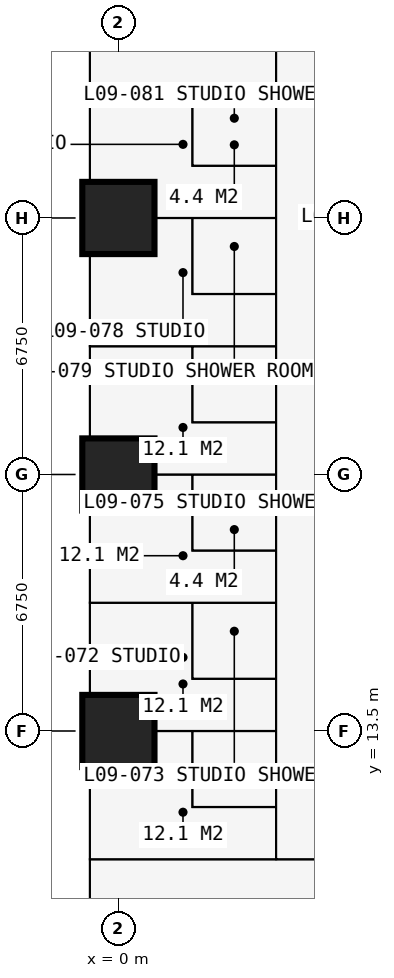
"""IFC4 building model, lengths in metres.
Left out: names, types, materials, properties, quantities, classifications, styles, units other than length and angle.
Written with IfcOpenShell. Run it as: python <this file> out.ifc"""

import sys

from ifc_helpers import new_model, si_unit, direction, frame, frame_2d, origin, origin_2d, place, context, subcontext, project, spatial, rectangle, extrude, element, fill, save


model = new_model("IFC4")
c1 = context("Model", 3, precision=1e-05, world=origin(), true_north=direction((0.0, 1.0)))
c2 = subcontext(c1, "Body", "Model", "MODEL_VIEW")
j1 = project(units=[si_unit("LENGTHUNIT", "METRE"), si_unit("PLANEANGLEUNIT", "RADIAN")], contexts=[c1])
p1 = place(None, origin())
s1 = spatial("IfcSite", under=j1, at=p1, CompositionType="ELEMENT")
p2 = place(p1, origin())
s2 = spatial("IfcBuilding", under=s1, at=p2, CompositionType="ELEMENT")
p3 = place(p2, frame((0.0, 0.0, 36.0)))
s3 = spatial("IfcBuildingStorey", under=s2, at=p3, CompositionType="ELEMENT", Elevation=36.0)
for number, where, z_axis, x_axis in (
    (1, (0.0, 13.5, 0.0), (0.0, 0.0, 1.0), (1.0, 0.0, 0.0)),
    (2, (0.0, 20.25, 0.0), (0.0, 0.0, 1.0), (1.0, 0.0, 0.0)),
    (3, (0.0, 27.0, 0.0), (0.0, 0.0, 1.0), (1.0, 0.0, 0.0)),
):
    element("IfcColumn", number, at=place(p3, frame(where, z_axis=z_axis, x_axis=x_axis)), inside=s3, PredefinedType="COLUMN", context=c2, shape_type="SweptSolid", body=[
        extrude(rectangle(XDim=1.9, YDim=1.9, at=origin_2d()), origin(), (0.0, 0.0, 1.0), 3.6),
    ])
p4 = place(p3, frame((-0.75, 20.25, 0.0), z_axis=(0.0, 0.0, 1.0), x_axis=(0.0, 1.0, 0.0)))
e4 = element("IfcWall", 4, at=p4, inside=s3, PredefinedType="SOLIDWALL", context=c2, shape_type="SweptSolid", body=[
    extrude(rectangle(XDim=6.75, YDim=0.15, at=frame_2d((3.375, 0.0))), origin(), (0.0, 0.0, 1.0), 3.375),
])
p5 = place(p4, frame((0.996, 0.0, 0.0)))
e5 = element("IfcOpeningElement", 5, at=p5, cuts=e4, PredefinedType="OPENING", context=c2, shape_type="SweptSolid", body=[
    extrude(rectangle(XDim=1.0, YDim=2.2, at=frame_2d((0.5, 1.1))), frame((0.0, 0.085, 0.0), z_axis=(0.0, -1.0, 0.0), x_axis=(1.0, 0.0, 0.0)), (0.0, 0.0, 1.0), 0.17),
])
p6 = place(p4, frame((2.042, 0.0, 0.9)))
e6 = element("IfcOpeningElement", 6, at=p6, cuts=e4, PredefinedType="OPENING", context=c2, shape_type="SweptSolid", body=[
    extrude(rectangle(XDim=1.2, YDim=1.8, at=frame_2d((0.6, 0.9))), frame((0.0, 0.085, 0.0), z_axis=(0.0, -1.0, 0.0), x_axis=(1.0, 0.0, 0.0)), (0.0, 0.0, 1.0), 0.17),
])
p7 = place(p4, frame((4.754, 0.0, 0.0)))
e7 = element("IfcOpeningElement", 7, at=p7, cuts=e4, PredefinedType="OPENING", context=c2, shape_type="SweptSolid", body=[
    extrude(rectangle(XDim=1.0, YDim=2.2, at=frame_2d((0.5, 1.1))), frame((0.0, 0.085, 0.0), z_axis=(0.0, -1.0, 0.0), x_axis=(1.0, 0.0, 0.0)), (0.0, 0.0, 1.0), 0.17),
])
p8 = place(p4, frame((3.508, 0.0, 0.9)))
e8 = element("IfcOpeningElement", 8, at=p8, cuts=e4, PredefinedType="OPENING", context=c2, shape_type="SweptSolid", body=[
    extrude(rectangle(XDim=1.2, YDim=1.8, at=frame_2d((0.6, 0.9))), frame((0.0, 0.085, 0.0), z_axis=(0.0, -1.0, 0.0), x_axis=(1.0, 0.0, 0.0)), (0.0, 0.0, 1.0), 0.17),
])
p9 = place(p3, frame((-0.85, 23.625, 0.0), z_axis=(0.0, 0.0, 1.0), x_axis=(-1.0, 0.0, 0.0)))
e9 = element("IfcWall", 9, at=p9, inside=s3, PredefinedType="USERDEFINED", context=c2, shape_type="SweptSolid", body=[
    extrude(rectangle(XDim=2.2, YDim=1.0, at=frame_2d((1.1, 0.0))), origin(), (0.0, 0.0, 1.0), 0.9),
])
p10 = place(p3, frame((-0.734, 10.125, 0.0), z_axis=(0.0, 0.0, 1.0), x_axis=(1.0, 0.0, 0.0)))
e10 = element("IfcWall", 10, at=p10, inside=s3, PredefinedType="PARTITIONING", context=c2, shape_type="SweptSolid", body=[
    extrude(rectangle(XDim=10.859, YDim=0.15, at=frame_2d((5.429, 0.0))), origin(), (0.0, 0.0, 1.0), 3.375),
])
p11 = place(p10, frame((5.134, 0.0, 0.0)))
e11 = element("IfcOpeningElement", 11, at=p11, cuts=e10, PredefinedType="OPENING", context=c2, shape_type="SweptSolid", body=[
    extrude(rectangle(XDim=1.0, YDim=2.2, at=frame_2d((0.5, 1.1))), frame((0.0, 0.085, 0.0), z_axis=(0.0, -1.0, 0.0), x_axis=(1.0, 0.0, 0.0)), (0.0, 0.0, 1.0), 0.17),
])
p12 = place(p3, frame((-0.734, 13.5, 0.0), z_axis=(0.0, 0.0, 1.0), x_axis=(1.0, 0.0, 0.0)))
e12 = element("IfcWall", 12, at=p12, inside=s3, PredefinedType="PARTITIONING", context=c2, shape_type="SweptSolid", body=[
    extrude(rectangle(XDim=4.884, YDim=0.175, at=frame_2d((2.442, 0.0))), origin(), (0.0, 0.0, 1.0), 2.61),
])
p13 = place(p3, frame((-0.734, 16.875, 0.0), z_axis=(0.0, 0.0, 1.0), x_axis=(1.0, 0.0, 0.0)))
e13 = element("IfcWall", 13, at=p13, inside=s3, PredefinedType="PARTITIONING", context=c2, shape_type="SweptSolid", body=[
    extrude(rectangle(XDim=4.884, YDim=0.175, at=frame_2d((2.442, 0.0))), origin(), (0.0, 0.0, 1.0), 3.375),
])
p14 = place(p3, frame((-0.734, 20.25, 0.0), z_axis=(0.0, 0.0, 1.0), x_axis=(1.0, 0.0, 0.0)))
e14 = element("IfcWall", 14, at=p14, inside=s3, PredefinedType="PARTITIONING", context=c2, shape_type="SweptSolid", body=[
    extrude(rectangle(XDim=4.884, YDim=0.175, at=frame_2d((2.442, 0.0))), origin(), (0.0, 0.0, 1.0), 2.61),
])
p15 = place(p3, frame((-0.734, 23.625, 0.0), z_axis=(0.0, 0.0, 1.0), x_axis=(1.0, 0.0, 0.0)))
e15 = element("IfcWall", 15, at=p15, inside=s3, PredefinedType="PARTITIONING", context=c2, shape_type="SweptSolid", body=[
    extrude(rectangle(XDim=4.884, YDim=0.175, at=frame_2d((2.442, 0.0))), origin(), (0.0, 0.0, 1.0), 3.375),
])
p16 = place(p3, frame((-0.734, 27.0, 0.0), z_axis=(0.0, 0.0, 1.0), x_axis=(1.0, 0.0, 0.0)))
e16 = element("IfcWall", 16, at=p16, inside=s3, PredefinedType="PARTITIONING", context=c2, shape_type="SweptSolid", body=[
    extrude(rectangle(XDim=4.884, YDim=0.175, at=frame_2d((2.442, 0.0))), origin(), (0.0, 0.0, 1.0), 2.877),
])
p17 = place(p3, frame((-0.734, 30.375, 0.0), z_axis=(0.0, 0.0, 1.0), x_axis=(1.0, 0.0, 0.0)))
e17 = element("IfcWall", 17, at=p17, inside=s3, PredefinedType="PARTITIONING", context=c2, shape_type="SweptSolid", body=[
    extrude(rectangle(XDim=4.884, YDim=0.15, at=frame_2d((2.442, 0.0))), origin(), (0.0, 0.0, 1.0), 3.375),
])
p18 = place(p3, frame((1.95, 11.5, 0.0), z_axis=(0.0, 0.0, 1.0), x_axis=(0.0, 1.0, 0.0)))
e18 = element("IfcWall", 18, at=p18, inside=s3, PredefinedType="PARTITIONING", context=c2, shape_type="SweptSolid", body=[
    extrude(rectangle(XDim=2.0, YDim=0.1, at=frame_2d((1.0, 0.0))), origin(), (0.0, 0.0, 1.0), 3.375),
])
p19 = place(p3, frame((1.95, 11.5, 0.0), z_axis=(0.0, 0.0, 1.0), x_axis=(1.0, 0.0, 0.0)))
e19 = element("IfcWall", 19, at=p19, inside=s3, PredefinedType="PARTITIONING", context=c2, shape_type="SweptSolid", body=[
    extrude(rectangle(XDim=2.2, YDim=0.1, at=frame_2d((1.1, 0.0))), origin(), (0.0, 0.0, 1.0), 3.375),
])
p20 = place(p19, frame((0.65, 0.0, 0.0)))
e20 = element("IfcOpeningElement", 20, at=p20, cuts=e19, PredefinedType="OPENING", context=c2, shape_type="SweptSolid", body=[
    extrude(rectangle(XDim=0.9, YDim=2.2, at=frame_2d((0.45, 1.1))), frame((0.0, 0.06, 0.0), z_axis=(0.0, -1.0, 0.0), x_axis=(1.0, 0.0, 0.0)), (0.0, 0.0, 1.0), 0.12),
])
p21 = place(p3, frame((1.95, 14.875, 0.0), z_axis=(0.0, 0.0, 1.0), x_axis=(0.0, 1.0, 0.0)))
e21 = element("IfcWall", 21, at=p21, inside=s3, PredefinedType="PARTITIONING", context=c2, shape_type="SweptSolid", body=[
    extrude(rectangle(XDim=2.0, YDim=0.1, at=frame_2d((1.0, 0.0))), origin(), (0.0, 0.0, 1.0), 3.375),
])
p22 = place(p3, frame((1.95, 14.875, 0.0), z_axis=(0.0, 0.0, 1.0), x_axis=(1.0, 0.0, 0.0)))
e22 = element("IfcWall", 22, at=p22, inside=s3, PredefinedType="PARTITIONING", context=c2, shape_type="SweptSolid", body=[
    extrude(rectangle(XDim=2.2, YDim=0.1, at=frame_2d((1.1, 0.0))), origin(), (0.0, 0.0, 1.0), 3.375),
])
p23 = place(p22, frame((0.65, 0.0, 0.0)))
e23 = element("IfcOpeningElement", 23, at=p23, cuts=e22, PredefinedType="OPENING", context=c2, shape_type="SweptSolid", body=[
    extrude(rectangle(XDim=0.9, YDim=2.2, at=frame_2d((0.45, 1.1))), frame((0.0, 0.06, 0.0), z_axis=(0.0, -1.0, 0.0), x_axis=(1.0, 0.0, 0.0)), (0.0, 0.0, 1.0), 0.12),
])
p24 = place(p3, frame((1.95, 18.25, 0.0), z_axis=(0.0, 0.0, 1.0), x_axis=(0.0, 1.0, 0.0)))
e24 = element("IfcWall", 24, at=p24, inside=s3, PredefinedType="PARTITIONING", context=c2, shape_type="SweptSolid", body=[
    extrude(rectangle(XDim=2.0, YDim=0.1, at=frame_2d((1.0, 0.0))), origin(), (0.0, 0.0, 1.0), 3.375),
])
p25 = place(p3, frame((1.95, 18.25, 0.0), z_axis=(0.0, 0.0, 1.0), x_axis=(1.0, 0.0, 0.0)))
e25 = element("IfcWall", 25, at=p25, inside=s3, PredefinedType="PARTITIONING", context=c2, shape_type="SweptSolid", body=[
    extrude(rectangle(XDim=2.2, YDim=0.1, at=frame_2d((1.1, 0.0))), origin(), (0.0, 0.0, 1.0), 3.375),
])
p26 = place(p25, frame((0.65, 0.0, 0.0)))
e26 = element("IfcOpeningElement", 26, at=p26, cuts=e25, PredefinedType="OPENING", context=c2, shape_type="SweptSolid", body=[
    extrude(rectangle(XDim=0.9, YDim=2.2, at=frame_2d((0.45, 1.1))), frame((0.0, 0.06, 0.0), z_axis=(0.0, -1.0, 0.0), x_axis=(1.0, 0.0, 0.0)), (0.0, 0.0, 1.0), 0.12),
])
p27 = place(p3, frame((1.95, 21.625, 0.0), z_axis=(0.0, 0.0, 1.0), x_axis=(0.0, 1.0, 0.0)))
e27 = element("IfcWall", 27, at=p27, inside=s3, PredefinedType="PARTITIONING", context=c2, shape_type="SweptSolid", body=[
    extrude(rectangle(XDim=2.0, YDim=0.1, at=frame_2d((1.0, 0.0))), origin(), (0.0, 0.0, 1.0), 3.375),
])
p28 = place(p3, frame((1.95, 21.625, 0.0), z_axis=(0.0, 0.0, 1.0), x_axis=(1.0, 0.0, 0.0)))
e28 = element("IfcWall", 28, at=p28, inside=s3, PredefinedType="PARTITIONING", context=c2, shape_type="SweptSolid", body=[
    extrude(rectangle(XDim=2.2, YDim=0.1, at=frame_2d((1.1, 0.0))), origin(), (0.0, 0.0, 1.0), 3.375),
])
p29 = place(p28, frame((0.65, 0.0, 0.0)))
e29 = element("IfcOpeningElement", 29, at=p29, cuts=e28, PredefinedType="OPENING", context=c2, shape_type="SweptSolid", body=[
    extrude(rectangle(XDim=0.9, YDim=2.2, at=frame_2d((0.45, 1.1))), frame((0.0, 0.06, 0.0), z_axis=(0.0, -1.0, 0.0), x_axis=(1.0, 0.0, 0.0)), (0.0, 0.0, 1.0), 0.12),
])
p30 = place(p3, frame((1.95, 25.0, 0.0), z_axis=(0.0, 0.0, 1.0), x_axis=(0.0, 1.0, 0.0)))
e30 = element("IfcWall", 30, at=p30, inside=s3, PredefinedType="PARTITIONING", context=c2, shape_type="SweptSolid", body=[
    extrude(rectangle(XDim=2.0, YDim=0.1, at=frame_2d((1.0, 0.0))), origin(), (0.0, 0.0, 1.0), 3.375),
])
p31 = place(p3, frame((1.95, 25.0, 0.0), z_axis=(0.0, 0.0, 1.0), x_axis=(1.0, 0.0, 0.0)))
e31 = element("IfcWall", 31, at=p31, inside=s3, PredefinedType="PARTITIONING", context=c2, shape_type="SweptSolid", body=[
    extrude(rectangle(XDim=2.2, YDim=0.1, at=frame_2d((1.1, 0.0))), origin(), (0.0, 0.0, 1.0), 3.375),
])
p32 = place(p31, frame((0.65, 0.0, 0.0)))
e32 = element("IfcOpeningElement", 32, at=p32, cuts=e31, PredefinedType="OPENING", context=c2, shape_type="SweptSolid", body=[
    extrude(rectangle(XDim=0.9, YDim=2.2, at=frame_2d((0.45, 1.1))), frame((0.0, 0.06, 0.0), z_axis=(0.0, -1.0, 0.0), x_axis=(1.0, 0.0, 0.0)), (0.0, 0.0, 1.0), 0.12),
])
p33 = place(p3, frame((1.95, 28.375, 0.0), z_axis=(0.0, 0.0, 1.0), x_axis=(0.0, 1.0, 0.0)))
e33 = element("IfcWall", 33, at=p33, inside=s3, PredefinedType="PARTITIONING", context=c2, shape_type="SweptSolid", body=[
    extrude(rectangle(XDim=2.0, YDim=0.1, at=frame_2d((1.0, 0.0))), origin(), (0.0, 0.0, 1.0), 3.375),
])
p34 = place(p3, frame((1.95, 28.375, 0.0), z_axis=(0.0, 0.0, 1.0), x_axis=(1.0, 0.0, 0.0)))
e34 = element("IfcWall", 34, at=p34, inside=s3, PredefinedType="PARTITIONING", context=c2, shape_type="SweptSolid", body=[
    extrude(rectangle(XDim=2.2, YDim=0.1, at=frame_2d((1.1, 0.0))), origin(), (0.0, 0.0, 1.0), 3.375),
])
p35 = place(p34, frame((0.65, 0.0, 0.0)))
e35 = element("IfcOpeningElement", 35, at=p35, cuts=e34, PredefinedType="OPENING", context=c2, shape_type="SweptSolid", body=[
    extrude(rectangle(XDim=0.9, YDim=2.2, at=frame_2d((0.45, 1.1))), frame((0.0, 0.06, 0.0), z_axis=(0.0, -1.0, 0.0), x_axis=(1.0, 0.0, 0.0)), (0.0, 0.0, 1.0), 0.12),
])
p36 = place(p3, frame((4.15, 10.125, 0.0), z_axis=(0.0, 0.0, 1.0), x_axis=(0.0, 1.0, 0.0)))
e36 = element("IfcWall", 36, at=p36, inside=s3, PredefinedType="PARTITIONING", context=c2, shape_type="SweptSolid", body=[
    extrude(rectangle(XDim=23.625, YDim=0.1, at=frame_2d((11.812, 0.0))), origin(), (0.0, 0.0, 1.0), 3.375),
])
p37 = place(p36, frame((0.2, 0.0, 0.0)))
e37 = element("IfcOpeningElement", 37, at=p37, cuts=e36, PredefinedType="OPENING", context=c2, shape_type="SweptSolid", body=[
    extrude(rectangle(XDim=0.95, YDim=2.2, at=frame_2d((0.475, 1.1))), frame((0.0, 0.06, 0.0), z_axis=(0.0, -1.0, 0.0), x_axis=(1.0, 0.0, 0.0)), (0.0, 0.0, 1.0), 0.12),
])
p38 = place(p36, frame((3.625, 0.0, 0.0)))
e38 = element("IfcOpeningElement", 38, at=p38, cuts=e36, PredefinedType="OPENING", context=c2, shape_type="SweptSolid", body=[
    extrude(rectangle(XDim=0.95, YDim=2.2, at=frame_2d((0.475, 1.1))), frame((0.0, 0.06, 0.0), z_axis=(0.0, -1.0, 0.0), x_axis=(1.0, 0.0, 0.0)), (0.0, 0.0, 1.0), 0.12),
])
p39 = place(p36, frame((7.0, 0.0, 0.0)))
e39 = element("IfcOpeningElement", 39, at=p39, cuts=e36, PredefinedType="OPENING", context=c2, shape_type="SweptSolid", body=[
    extrude(rectangle(XDim=0.95, YDim=2.2, at=frame_2d((0.475, 1.1))), frame((0.0, 0.06, 0.0), z_axis=(0.0, -1.0, 0.0), x_axis=(1.0, 0.0, 0.0)), (0.0, 0.0, 1.0), 0.12),
])
p40 = place(p36, frame((10.375, 0.0, 0.0)))
e40 = element("IfcOpeningElement", 40, at=p40, cuts=e36, PredefinedType="OPENING", context=c2, shape_type="SweptSolid", body=[
    extrude(rectangle(XDim=0.95, YDim=2.2, at=frame_2d((0.475, 1.1))), frame((0.0, 0.06, 0.0), z_axis=(0.0, -1.0, 0.0), x_axis=(1.0, 0.0, 0.0)), (0.0, 0.0, 1.0), 0.12),
])
p41 = place(p36, frame((13.75, 0.0, 0.0)))
e41 = element("IfcOpeningElement", 41, at=p41, cuts=e36, PredefinedType="OPENING", context=c2, shape_type="SweptSolid", body=[
    extrude(rectangle(XDim=0.95, YDim=2.2, at=frame_2d((0.475, 1.1))), frame((0.0, 0.06, 0.0), z_axis=(0.0, -1.0, 0.0), x_axis=(1.0, 0.0, 0.0)), (0.0, 0.0, 1.0), 0.12),
])
p42 = place(p36, frame((17.125, 0.0, 0.0)))
e42 = element("IfcOpeningElement", 42, at=p42, cuts=e36, PredefinedType="OPENING", context=c2, shape_type="SweptSolid", body=[
    extrude(rectangle(XDim=0.95, YDim=2.2, at=frame_2d((0.475, 1.1))), frame((0.0, 0.06, 0.0), z_axis=(0.0, -1.0, 0.0), x_axis=(1.0, 0.0, 0.0)), (0.0, 0.0, 1.0), 0.12),
])
p43 = place(p5, origin())
e43 = element("IfcDoor", 43, at=p43, inside=s3, OperationType="SINGLE_SWING_LEFT", PredefinedType="DOOR", context=c2, shape_type="SweptSolid", body=[
    extrude(rectangle(XDim=1.0, YDim=2.2, at=frame_2d((0.5, 1.1))), frame((0.0, 0.025, 0.0), z_axis=(0.0, -1.0, 0.0), x_axis=(1.0, 0.0, 0.0)), (0.0, 0.0, 1.0), 0.05),
])
fill(e5, e43)
p44 = place(p6, origin())
e44 = element("IfcWindow", 44, at=p44, inside=s3, PartitioningType="SINGLE_PANEL", PredefinedType="WINDOW", context=c2, shape_type="SweptSolid", body=[
    extrude(rectangle(XDim=1.2, YDim=1.8, at=frame_2d((0.6, 0.9))), frame((0.0, 0.03, 0.0), z_axis=(0.0, -1.0, 0.0), x_axis=(1.0, 0.0, 0.0)), (0.0, 0.0, 1.0), 0.06),
])
fill(e6, e44)
p45 = place(p7, origin())
e45 = element("IfcDoor", 45, at=p45, inside=s3, OperationType="SINGLE_SWING_RIGHT", PredefinedType="DOOR", context=c2, shape_type="SweptSolid", body=[
    extrude(rectangle(XDim=1.0, YDim=2.2, at=frame_2d((0.5, 1.1))), frame((0.0, 0.025, 0.0), z_axis=(0.0, -1.0, 0.0), x_axis=(1.0, 0.0, 0.0)), (0.0, 0.0, 1.0), 0.05),
])
fill(e7, e45)
p46 = place(p8, origin())
e46 = element("IfcWindow", 46, at=p46, inside=s3, PartitioningType="SINGLE_PANEL", PredefinedType="WINDOW", context=c2, shape_type="SweptSolid", body=[
    extrude(rectangle(XDim=1.2, YDim=1.8, at=frame_2d((0.6, 0.9))), frame((0.0, 0.03, 0.0), z_axis=(0.0, -1.0, 0.0), x_axis=(1.0, 0.0, 0.0)), (0.0, 0.0, 1.0), 0.06),
])
fill(e8, e46)
p47 = place(p11, origin())
e47 = element("IfcDoor", 47, at=p47, inside=s3, OperationType="SINGLE_SWING_LEFT", PredefinedType="DOOR", context=c2, shape_type="SweptSolid", body=[
    extrude(rectangle(XDim=1.0, YDim=2.2, at=frame_2d((0.5, 1.1))), frame((0.0, 0.025, 0.0), z_axis=(0.0, -1.0, 0.0), x_axis=(1.0, 0.0, 0.0)), (0.0, 0.0, 1.0), 0.05),
])
fill(e11, e47)
p48 = place(p37, origin())
e48 = element("IfcDoor", 48, at=p48, inside=s3, OperationType="SINGLE_SWING_LEFT", PredefinedType="DOOR", context=c2, shape_type="SweptSolid", body=[
    extrude(rectangle(XDim=0.95, YDim=2.2, at=frame_2d((0.475, 1.1))), frame((0.0, 0.025, 0.0), z_axis=(0.0, -1.0, 0.0), x_axis=(1.0, 0.0, 0.0)), (0.0, 0.0, 1.0), 0.05),
])
fill(e37, e48)
p49 = place(p20, origin())
e49 = element("IfcDoor", 49, at=p49, inside=s3, OperationType="SINGLE_SWING_RIGHT", PredefinedType="DOOR", context=c2, shape_type="SweptSolid", body=[
    extrude(rectangle(XDim=0.9, YDim=2.2, at=frame_2d((0.45, 1.1))), frame((0.0, 0.025, 0.0), z_axis=(0.0, -1.0, 0.0), x_axis=(1.0, 0.0, 0.0)), (0.0, 0.0, 1.0), 0.05),
])
fill(e20, e49)
p50 = place(p38, origin())
e50 = element("IfcDoor", 50, at=p50, inside=s3, OperationType="SINGLE_SWING_LEFT", PredefinedType="DOOR", context=c2, shape_type="SweptSolid", body=[
    extrude(rectangle(XDim=0.95, YDim=2.2, at=frame_2d((0.475, 1.1))), frame((0.0, 0.025, 0.0), z_axis=(0.0, -1.0, 0.0), x_axis=(1.0, 0.0, 0.0)), (0.0, 0.0, 1.0), 0.05),
])
fill(e38, e50)
p51 = place(p23, origin())
e51 = element("IfcDoor", 51, at=p51, inside=s3, OperationType="SINGLE_SWING_RIGHT", PredefinedType="DOOR", context=c2, shape_type="SweptSolid", body=[
    extrude(rectangle(XDim=0.9, YDim=2.2, at=frame_2d((0.45, 1.1))), frame((0.0, 0.025, 0.0), z_axis=(0.0, -1.0, 0.0), x_axis=(1.0, 0.0, 0.0)), (0.0, 0.0, 1.0), 0.05),
])
fill(e23, e51)
p52 = place(p39, origin())
e52 = element("IfcDoor", 52, at=p52, inside=s3, OperationType="SINGLE_SWING_LEFT", PredefinedType="DOOR", context=c2, shape_type="SweptSolid", body=[
    extrude(rectangle(XDim=0.95, YDim=2.2, at=frame_2d((0.475, 1.1))), frame((0.0, 0.025, 0.0), z_axis=(0.0, -1.0, 0.0), x_axis=(1.0, 0.0, 0.0)), (0.0, 0.0, 1.0), 0.05),
])
fill(e39, e52)
p53 = place(p26, origin())
e53 = element("IfcDoor", 53, at=p53, inside=s3, OperationType="SINGLE_SWING_RIGHT", PredefinedType="DOOR", context=c2, shape_type="SweptSolid", body=[
    extrude(rectangle(XDim=0.9, YDim=2.2, at=frame_2d((0.45, 1.1))), frame((0.0, 0.025, 0.0), z_axis=(0.0, -1.0, 0.0), x_axis=(1.0, 0.0, 0.0)), (0.0, 0.0, 1.0), 0.05),
])
fill(e26, e53)
p54 = place(p40, origin())
e54 = element("IfcDoor", 54, at=p54, inside=s3, OperationType="SINGLE_SWING_LEFT", PredefinedType="DOOR", context=c2, shape_type="SweptSolid", body=[
    extrude(rectangle(XDim=0.95, YDim=2.2, at=frame_2d((0.475, 1.1))), frame((0.0, 0.025, 0.0), z_axis=(0.0, -1.0, 0.0), x_axis=(1.0, 0.0, 0.0)), (0.0, 0.0, 1.0), 0.05),
])
fill(e40, e54)
p55 = place(p29, origin())
e55 = element("IfcDoor", 55, at=p55, inside=s3, OperationType="SINGLE_SWING_RIGHT", PredefinedType="DOOR", context=c2, shape_type="SweptSolid", body=[
    extrude(rectangle(XDim=0.9, YDim=2.2, at=frame_2d((0.45, 1.1))), frame((0.0, 0.025, 0.0), z_axis=(0.0, -1.0, 0.0), x_axis=(1.0, 0.0, 0.0)), (0.0, 0.0, 1.0), 0.05),
])
fill(e29, e55)
p56 = place(p41, origin())
e56 = element("IfcDoor", 56, at=p56, inside=s3, OperationType="SINGLE_SWING_LEFT", PredefinedType="DOOR", context=c2, shape_type="SweptSolid", body=[
    extrude(rectangle(XDim=0.95, YDim=2.2, at=frame_2d((0.475, 1.1))), frame((0.0, 0.025, 0.0), z_axis=(0.0, -1.0, 0.0), x_axis=(1.0, 0.0, 0.0)), (0.0, 0.0, 1.0), 0.05),
])
fill(e41, e56)
p57 = place(p32, origin())
e57 = element("IfcDoor", 57, at=p57, inside=s3, OperationType="SINGLE_SWING_RIGHT", PredefinedType="DOOR", context=c2, shape_type="SweptSolid", body=[
    extrude(rectangle(XDim=0.9, YDim=2.2, at=frame_2d((0.45, 1.1))), frame((0.0, 0.025, 0.0), z_axis=(0.0, -1.0, 0.0), x_axis=(1.0, 0.0, 0.0)), (0.0, 0.0, 1.0), 0.05),
])
fill(e32, e57)
p58 = place(p42, origin())
e58 = element("IfcDoor", 58, at=p58, inside=s3, OperationType="SINGLE_SWING_LEFT", PredefinedType="DOOR", context=c2, shape_type="SweptSolid", body=[
    extrude(rectangle(XDim=0.95, YDim=2.2, at=frame_2d((0.475, 1.1))), frame((0.0, 0.025, 0.0), z_axis=(0.0, -1.0, 0.0), x_axis=(1.0, 0.0, 0.0)), (0.0, 0.0, 1.0), 0.05),
])
fill(e42, e58)
p59 = place(p35, origin())
e59 = element("IfcDoor", 59, at=p59, inside=s3, OperationType="SINGLE_SWING_RIGHT", PredefinedType="DOOR", context=c2, shape_type="SweptSolid", body=[
    extrude(rectangle(XDim=0.9, YDim=2.2, at=frame_2d((0.45, 1.1))), frame((0.0, 0.025, 0.0), z_axis=(0.0, -1.0, 0.0), x_axis=(1.0, 0.0, 0.0)), (0.0, 0.0, 1.0), 0.05),
])
fill(e35, e59)
save(model, sys.argv[1])
